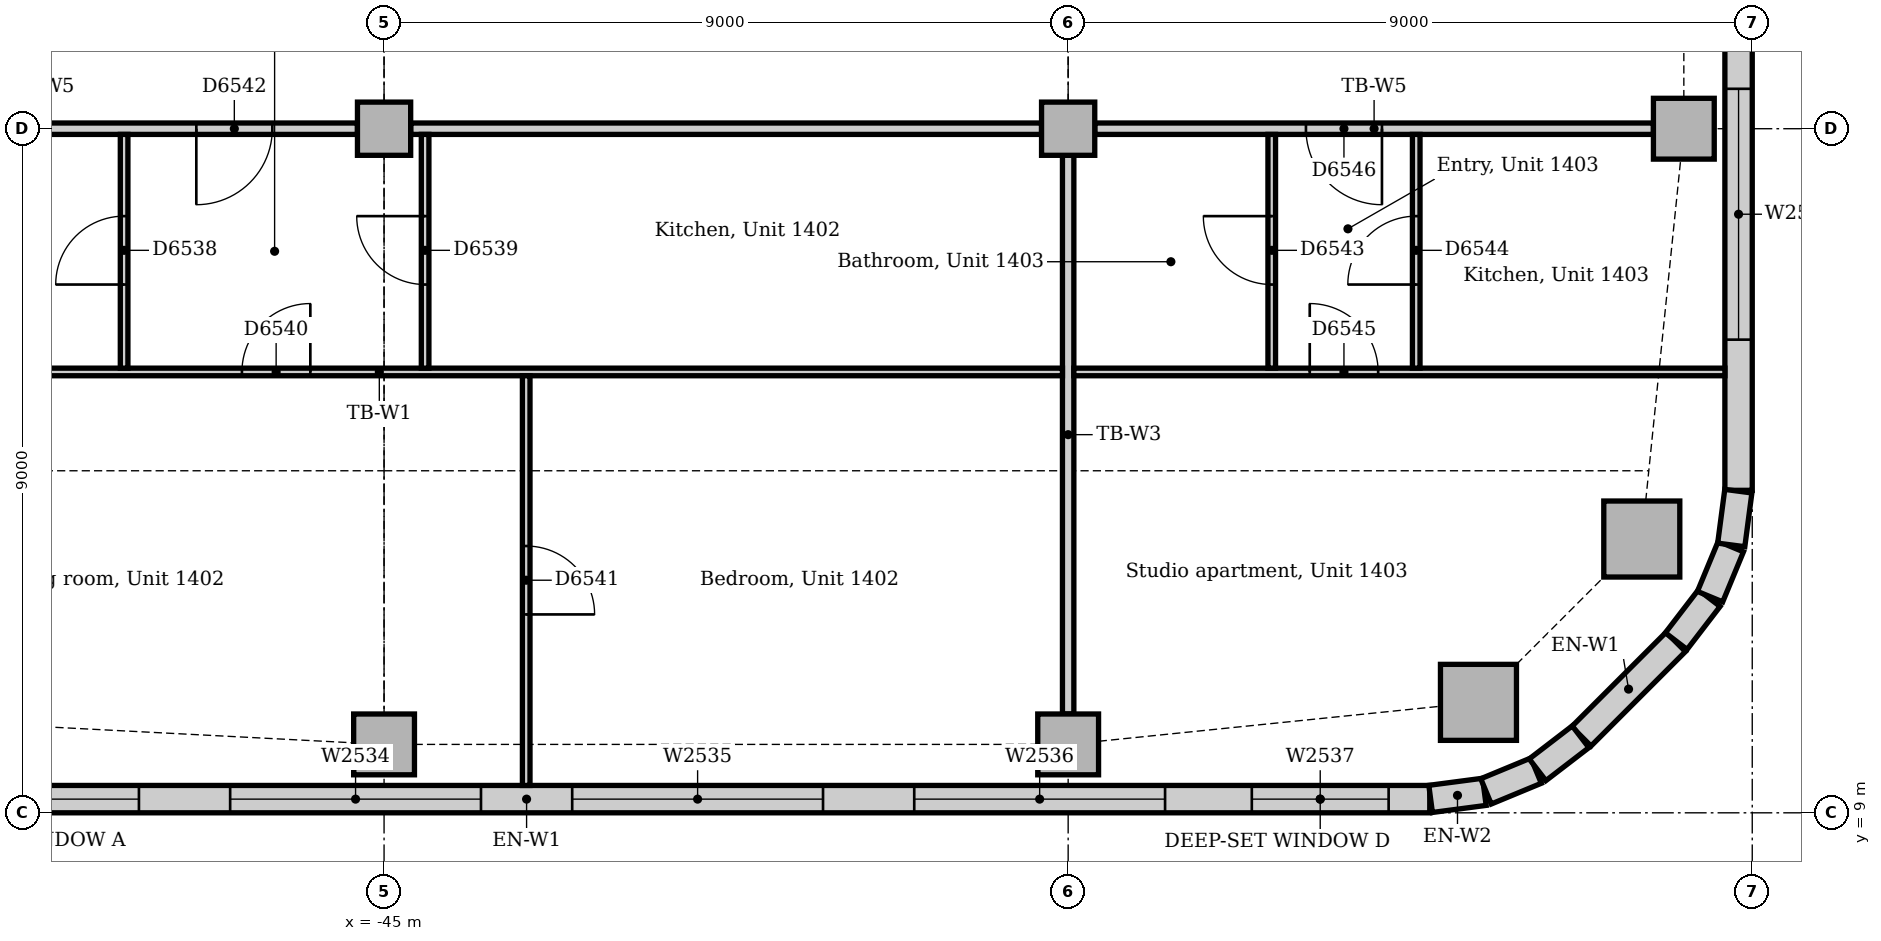
"""IFC4 building model, lengths in metres.
Left out: names, types, materials, properties, quantities, classifications, styles, units other than length and angle.
Written with IfcOpenShell. Run it as: python <this file> out.ifc"""

import sys

from ifc_helpers import new_model, si_unit, direction, frame, frame_2d, origin, origin_2d, place, context, subcontext, project, spatial, rectangle, extrude, element, fill, save


model = new_model("IFC4")
c1 = context("Model", 3, precision=1e-05, world=origin(), true_north=direction((0.0, 1.0)))
c2 = subcontext(c1, "Body", "Model", "MODEL_VIEW")
j1 = project(units=[si_unit("LENGTHUNIT", "METRE"), si_unit("PLANEANGLEUNIT", "RADIAN")], contexts=[c1])
p1 = place(None, origin())
s1 = spatial("IfcSite", under=j1, at=p1, CompositionType="ELEMENT")
p2 = place(p1, origin())
s2 = spatial("IfcBuilding", under=s1, at=p2, CompositionType="ELEMENT")
p3 = place(p2, frame((0.0, 0.0, 63.0)))
s3 = spatial("IfcBuildingStorey", under=s2, at=p3, CompositionType="ELEMENT", Elevation=63.0)
for number, where, z_axis, x_axis in (
    (1, (-30.602, 10.453, 0.0), (0.0, 0.0, 1.0), (1.0, 0.0, 0.0)),
    (2, (-28.453, 12.602, 0.0), (0.0, 0.0, 1.0), (1.0, 0.0, 0.0)),
):
    element("IfcColumn", number, at=place(p3, frame(where, z_axis=z_axis, x_axis=x_axis)), inside=s3, PredefinedType="COLUMN", context=c2, shape_type="SweptSolid", body=[
        extrude(rectangle(XDim=1.0, YDim=1.0, at=origin_2d()), origin(), (0.0, 0.0, 1.0), 3.85),
    ])
for number, where, z_axis, x_axis in (
    (3, (-45.0, 9.9, 0.0), (0.0, 0.0, 1.0), (1.0, 0.0, 0.0)),
    (4, (-36.0, 9.9, 0.0), (0.0, 0.0, 1.0), (1.0, 0.0, 0.0)),
    (5, (-27.9, 18.0, 0.0), (0.0, 0.0, 1.0), (1.0, 0.0, 0.0)),
):
    element("IfcColumn", number, at=place(p3, frame(where, z_axis=z_axis, x_axis=x_axis)), inside=s3, PredefinedType="COLUMN", context=c2, shape_type="SweptSolid", body=[
        extrude(rectangle(XDim=0.8, YDim=0.8, at=origin_2d()), origin(), (0.0, 0.0, 1.0), 3.85),
    ])
for number, where, z_axis, x_axis in (
    (6, (-45.0, 18.0, 0.0), (0.0, 0.0, 1.0), (1.0, 0.0, 0.0)),
    (7, (-36.0, 18.0, 0.0), (0.0, 0.0, 1.0), (1.0, 0.0, 0.0)),
):
    element("IfcColumn", number, at=place(p3, frame(where, z_axis=z_axis, x_axis=x_axis)), inside=s3, PredefinedType="COLUMN", context=c2, shape_type="SweptSolid", body=[
        extrude(rectangle(XDim=0.7, YDim=0.7, at=origin_2d()), origin(), (0.0, 0.0, 1.0), 3.85),
    ])
p4 = place(p3, frame((-55.007, 9.18, 0.0), z_axis=(0.0, 0.0, 1.0), x_axis=(1.0, 0.0, 0.0)))
e8 = element("IfcWall", 8, at=p4, inside=s3, PredefinedType="STANDARD", context=c2, shape_type="SweptSolid", body=[
    extrude(rectangle(XDim=23.765, YDim=0.36, at=frame_2d((11.882, 0.0))), origin(), (0.0, 0.0, 1.0), 3.85),
])
p5 = place(p4, frame((3.482, 0.0, 0.9)))
e9 = element("IfcOpeningElement", 9, at=p5, cuts=e8, PredefinedType="OPENING", context=c2, shape_type="SweptSolid", body=[
    extrude(rectangle(XDim=3.3, YDim=1.6, at=frame_2d((1.65, 0.8))), frame((0.0, 0.19, 0.0), z_axis=(0.0, -1.0, 0.0), x_axis=(1.0, 0.0, 0.0)), (0.0, 0.0, 1.0), 0.38),
])
p6 = place(p4, frame((7.982, 0.0, 0.9)))
e10 = element("IfcOpeningElement", 10, at=p6, cuts=e8, PredefinedType="OPENING", context=c2, shape_type="SweptSolid", body=[
    extrude(rectangle(XDim=3.3, YDim=1.6, at=frame_2d((1.65, 0.8))), frame((0.0, 0.19, 0.0), z_axis=(0.0, -1.0, 0.0), x_axis=(1.0, 0.0, 0.0)), (0.0, 0.0, 1.0), 0.38),
])
p7 = place(p4, frame((12.482, 0.0, 0.9)))
e11 = element("IfcOpeningElement", 11, at=p7, cuts=e8, PredefinedType="OPENING", context=c2, shape_type="SweptSolid", body=[
    extrude(rectangle(XDim=3.3, YDim=1.6, at=frame_2d((1.65, 0.8))), frame((0.0, 0.19, 0.0), z_axis=(0.0, -1.0, 0.0), x_axis=(1.0, 0.0, 0.0)), (0.0, 0.0, 1.0), 0.38),
])
p8 = place(p4, frame((16.982, 0.0, 0.9)))
e12 = element("IfcOpeningElement", 12, at=p8, cuts=e8, PredefinedType="OPENING", context=c2, shape_type="SweptSolid", body=[
    extrude(rectangle(XDim=3.3, YDim=1.6, at=frame_2d((1.65, 0.8))), frame((0.0, 0.19, 0.0), z_axis=(0.0, -1.0, 0.0), x_axis=(1.0, 0.0, 0.0)), (0.0, 0.0, 1.0), 0.38),
])
p9 = place(p4, frame((21.424, 0.0, 0.9)))
e13 = element("IfcOpeningElement", 13, at=p9, cuts=e8, PredefinedType="OPENING", context=c2, shape_type="SweptSolid", body=[
    extrude(rectangle(XDim=1.8, YDim=1.6, at=frame_2d((0.9, 0.8))), frame((0.0, 0.19, 0.0), z_axis=(0.0, -1.0, 0.0), x_axis=(1.0, 0.0, 0.0)), (0.0, 0.0, 1.0), 0.38),
])
p10 = place(p3, frame((-29.249, 10.006, 0.0), z_axis=(0.0, 0.0, 1.0), x_axis=(0.707106781187, 0.707106781187, 0.0)))
e14 = element("IfcWall", 14, at=p10, inside=s3, PredefinedType="STANDARD", context=c2, shape_type="SweptSolid", body=[
    extrude(rectangle(XDim=1.757, YDim=0.36, at=frame_2d((0.879, 0.0))), origin(), (0.0, 0.0, 1.0), 3.85),
])
p11 = place(p3, frame((-27.18, 13.243, 0.0), z_axis=(0.0, 0.0, 1.0), x_axis=(0.0, 1.0, 0.0)))
e15 = element("IfcWall", 15, at=p11, inside=s3, PredefinedType="STANDARD", context=c2, shape_type="SweptSolid", body=[
    extrude(rectangle(XDim=7.757, YDim=0.36, at=frame_2d((3.879, 0.0))), origin(), (0.0, 0.0, 1.0), 3.85),
])
p12 = place(p11, frame((1.982, 0.0, 0.9)))
e16 = element("IfcOpeningElement", 16, at=p12, cuts=e15, PredefinedType="OPENING", context=c2, shape_type="SweptSolid", body=[
    extrude(rectangle(XDim=3.3, YDim=1.6, at=frame_2d((1.65, 0.8))), frame((0.0, 0.19, 0.0), z_axis=(0.0, -1.0, 0.0), x_axis=(1.0, 0.0, 0.0)), (0.0, 0.0, 1.0), 0.38),
])
for number, where, z_axis, x_axis in (
    (17, (-31.231, 9.183, 0.0), (0.0, 0.0, 1.0), (0.991, 0.131, 0.0)),
    (18, (-30.503, 9.282, 0.0), (0.0, 0.0, 1.0), (0.924, 0.383, 0.0)),
):
    element("IfcWall", number, at=place(p3, frame(where, z_axis=z_axis, x_axis=x_axis)), inside=s3, PredefinedType="STANDARD", context=c2, shape_type="SweptSolid", body=[
        extrude(rectangle(XDim=0.713, YDim=0.36, at=frame_2d((0.356, 0.0))), origin(), (0.0, 0.0, 1.0), 3.85),
    ])
for number, where, z_axis, x_axis in (
    (19, (-29.825, 9.566, 0.0), (0.0, 0.0, 1.0), (0.793, 0.609, 0.0)),
    (20, (-28.0, 11.259, 0.0), (0.0, 0.0, 1.0), (0.609, 0.793, 0.0)),
):
    element("IfcWall", number, at=place(p3, frame(where, z_axis=z_axis, x_axis=x_axis)), inside=s3, PredefinedType="STANDARD", context=c2, shape_type="SweptSolid", body=[
        extrude(rectangle(XDim=0.713, YDim=0.36, at=frame_2d((0.357, 0.0))), origin(), (0.0, 0.0, 1.0), 3.85),
    ])
for number, where, z_axis, x_axis in (
    (21, (-27.555, 11.844, 0.0), (0.0, 0.0, 1.0), (0.383, 0.924, 0.0)),
    (22, (-27.276, 12.524, 0.0), (0.0, 0.0, 1.0), (0.131, 0.991, 0.0)),
):
    element("IfcWall", number, at=place(p3, frame(where, z_axis=z_axis, x_axis=x_axis)), inside=s3, PredefinedType="STANDARD", context=c2, shape_type="SweptSolid", body=[
        extrude(rectangle(XDim=0.713, YDim=0.36, at=frame_2d((0.356, 0.0))), origin(), (0.0, 0.0, 1.0), 3.85),
    ])
p13 = place(p3, frame((-35.65, 18.0, 0.0), z_axis=(0.0, 0.0, 1.0), x_axis=(1.0, 0.0, 0.0)))
e23 = element("IfcWall", 23, at=p13, inside=s3, PredefinedType="PARTITIONING", context=c2, shape_type="SweptSolid", body=[
    extrude(rectangle(XDim=7.35, YDim=0.15, at=frame_2d((3.675, 0.0))), origin(), (0.0, 0.0, 1.0), 3.158),
])
p14 = place(p13, frame((2.778, 0.0, 0.0)))
e24 = element("IfcOpeningElement", 24, at=p14, cuts=e23, PredefinedType="OPENING", context=c2, shape_type="SweptSolid", body=[
    extrude(rectangle(XDim=1.0, YDim=2.1, at=frame_2d((0.5, 1.05))), frame((0.0, 0.085, 0.0), z_axis=(0.0, -1.0, 0.0), x_axis=(1.0, 0.0, 0.0)), (0.0, 0.0, 1.0), 0.17),
])
p15 = place(p3, frame((-44.65, 18.0, 0.0), z_axis=(0.0, 0.0, 1.0), x_axis=(1.0, 0.0, 0.0)))
e25 = element("IfcWall", 25, at=p15, inside=s3, PredefinedType="PARTITIONING", context=c2, shape_type="SweptSolid", body=[
    extrude(rectangle(XDim=8.3, YDim=0.15, at=frame_2d((4.15, 0.0))), origin(), (0.0, 0.0, 1.0), 3.158),
])
p16 = place(p3, frame((-53.65, 18.0, 0.0), z_axis=(0.0, 0.0, 1.0), x_axis=(1.0, 0.0, 0.0)))
e26 = element("IfcWall", 26, at=p16, inside=s3, PredefinedType="PARTITIONING", context=c2, shape_type="SweptSolid", body=[
    extrude(rectangle(XDim=8.3, YDim=0.15, at=frame_2d((4.15, 0.0))), origin(), (0.0, 0.0, 1.0), 3.158),
])
p17 = place(p16, frame((6.18, 0.0, 0.0)))
e27 = element("IfcOpeningElement", 27, at=p17, cuts=e26, PredefinedType="OPENING", context=c2, shape_type="SweptSolid", body=[
    extrude(rectangle(XDim=1.0, YDim=2.1, at=frame_2d((0.5, 1.05))), frame((0.0, 0.085, 0.0), z_axis=(0.0, -1.0, 0.0), x_axis=(1.0, 0.0, 0.0)), (0.0, 0.0, 1.0), 0.17),
])
p18 = place(p3, frame((-36.0, 10.3, 0.0), z_axis=(0.0, 0.0, 1.0), x_axis=(0.0, 1.0, 0.0)))
e28 = element("IfcWall", 28, at=p18, inside=s3, PredefinedType="PARTITIONING", context=c2, shape_type="SweptSolid", body=[
    extrude(rectangle(XDim=7.35, YDim=0.15, at=frame_2d((3.675, 0.0))), origin(), (0.0, 0.0, 1.0), 3.256),
])
p19 = place(p3, frame((-54.05, 14.8, 0.0), z_axis=(0.0, 0.0, 1.0), x_axis=(1.0, 0.0, 0.0)))
e29 = element("IfcWall", 29, at=p19, inside=s3, PredefinedType="PARTITIONING", context=c2, shape_type="SweptSolid", body=[
    extrude(rectangle(XDim=17.975, YDim=0.1, at=frame_2d((8.988, 0.0))), origin(), (0.0, 0.0, 1.0), 3.85),
])
p20 = place(p19, frame((7.18, 0.0, 0.0)))
e30 = element("IfcOpeningElement", 30, at=p20, cuts=e29, PredefinedType="OPENING", context=c2, shape_type="SweptSolid", body=[
    extrude(rectangle(XDim=0.9, YDim=2.1, at=frame_2d((0.45, 1.05))), frame((0.0, 0.06, 0.0), z_axis=(0.0, -1.0, 0.0), x_axis=(1.0, 0.0, 0.0)), (0.0, 0.0, 1.0), 0.12),
])
p21 = place(p3, frame((-35.925, 14.8, 0.0), z_axis=(0.0, 0.0, 1.0), x_axis=(1.0, 0.0, 0.0)))
e31 = element("IfcWall", 31, at=p21, inside=s3, PredefinedType="PARTITIONING", context=c2, shape_type="SweptSolid", body=[
    extrude(rectangle(XDim=8.565, YDim=0.1, at=frame_2d((4.282, 0.0))), origin(), (0.0, 0.0, 1.0), 3.85),
])
p22 = place(p21, frame((3.103, 0.0, 0.0)))
e32 = element("IfcOpeningElement", 32, at=p22, cuts=e31, PredefinedType="OPENING", context=c2, shape_type="SweptSolid", body=[
    extrude(rectangle(XDim=0.9, YDim=2.1, at=frame_2d((0.45, 1.05))), frame((0.0, 0.06, 0.0), z_axis=(0.0, -1.0, 0.0), x_axis=(1.0, 0.0, 0.0)), (0.0, 0.0, 1.0), 0.12),
])
p23 = place(p3, frame((-43.13, 9.36, 0.0), z_axis=(0.0, 0.0, 1.0), x_axis=(0.0, 1.0, 0.0)))
e33 = element("IfcWall", 33, at=p23, inside=s3, PredefinedType="PARTITIONING", context=c2, shape_type="SweptSolid", body=[
    extrude(rectangle(XDim=5.39, YDim=0.1, at=frame_2d((2.695, 0.0))), origin(), (0.0, 0.0, 1.0), 3.85),
])
p24 = place(p23, frame((2.25, 0.0, 0.0)))
e34 = element("IfcOpeningElement", 34, at=p24, cuts=e33, PredefinedType="OPENING", context=c2, shape_type="SweptSolid", body=[
    extrude(rectangle(XDim=0.9, YDim=2.1, at=frame_2d((0.45, 1.05))), frame((0.0, 0.06, 0.0), z_axis=(0.0, -1.0, 0.0), x_axis=(1.0, 0.0, 0.0)), (0.0, 0.0, 1.0), 0.12),
])
p25 = place(p3, frame((-48.42, 14.85, 0.0), z_axis=(0.0, 0.0, 1.0), x_axis=(0.0, 1.0, 0.0)))
e35 = element("IfcWall", 35, at=p25, inside=s3, PredefinedType="PARTITIONING", context=c2, shape_type="SweptSolid", body=[
    extrude(rectangle(XDim=3.075, YDim=0.1, at=frame_2d((1.538, 0.0))), origin(), (0.0, 0.0, 1.0), 3.85),
])
p26 = place(p25, frame((1.1, 0.0, 0.0)))
e36 = element("IfcOpeningElement", 36, at=p26, cuts=e35, PredefinedType="OPENING", context=c2, shape_type="SweptSolid", body=[
    extrude(rectangle(XDim=0.9, YDim=2.1, at=frame_2d((0.45, 1.05))), frame((0.0, 0.06, 0.0), z_axis=(0.0, -1.0, 0.0), x_axis=(1.0, 0.0, 0.0)), (0.0, 0.0, 1.0), 0.12),
])
p27 = place(p3, frame((-44.46, 14.85, 0.0), z_axis=(0.0, 0.0, 1.0), x_axis=(0.0, 1.0, 0.0)))
e37 = element("IfcWall", 37, at=p27, inside=s3, PredefinedType="PARTITIONING", context=c2, shape_type="SweptSolid", body=[
    extrude(rectangle(XDim=3.075, YDim=0.1, at=frame_2d((1.538, 0.0))), origin(), (0.0, 0.0, 1.0), 3.85),
])
p28 = place(p27, frame((1.1, 0.0, 0.0)))
e38 = element("IfcOpeningElement", 38, at=p28, cuts=e37, PredefinedType="OPENING", context=c2, shape_type="SweptSolid", body=[
    extrude(rectangle(XDim=0.9, YDim=2.1, at=frame_2d((0.45, 1.05))), frame((0.0, 0.06, 0.0), z_axis=(0.0, -1.0, 0.0), x_axis=(1.0, 0.0, 0.0)), (0.0, 0.0, 1.0), 0.12),
])
p29 = place(p3, frame((-33.322, 14.85, 0.0), z_axis=(0.0, 0.0, 1.0), x_axis=(0.0, 1.0, 0.0)))
e39 = element("IfcWall", 39, at=p29, inside=s3, PredefinedType="PARTITIONING", context=c2, shape_type="SweptSolid", body=[
    extrude(rectangle(XDim=3.075, YDim=0.1, at=frame_2d((1.538, 0.0))), origin(), (0.0, 0.0, 1.0), 3.85),
])
p30 = place(p29, frame((1.1, 0.0, 0.0)))
e40 = element("IfcOpeningElement", 40, at=p30, cuts=e39, PredefinedType="OPENING", context=c2, shape_type="SweptSolid", body=[
    extrude(rectangle(XDim=0.9, YDim=2.1, at=frame_2d((0.45, 1.05))), frame((0.0, 0.06, 0.0), z_axis=(0.0, -1.0, 0.0), x_axis=(1.0, 0.0, 0.0)), (0.0, 0.0, 1.0), 0.12),
])
p31 = place(p3, frame((-31.421, 14.85, 0.0), z_axis=(0.0, 0.0, 1.0), x_axis=(0.0, 1.0, 0.0)))
e41 = element("IfcWall", 41, at=p31, inside=s3, PredefinedType="PARTITIONING", context=c2, shape_type="SweptSolid", body=[
    extrude(rectangle(XDim=3.075, YDim=0.1, at=frame_2d((1.538, 0.0))), origin(), (0.0, 0.0, 1.0), 3.85),
])
p32 = place(p31, frame((1.1, 0.0, 0.0)))
e42 = element("IfcOpeningElement", 42, at=p32, cuts=e41, PredefinedType="OPENING", context=c2, shape_type="SweptSolid", body=[
    extrude(rectangle(XDim=0.9, YDim=2.1, at=frame_2d((0.45, 1.05))), frame((0.0, 0.06, 0.0), z_axis=(0.0, -1.0, 0.0), x_axis=(1.0, 0.0, 0.0)), (0.0, 0.0, 1.0), 0.12),
])
p33 = place(p5, origin())
e43 = element("IfcWindow", 43, at=p33, inside=s3, PartitioningType="SINGLE_PANEL", PredefinedType="WINDOW", context=c2, shape_type="SweptSolid", body=[
    extrude(rectangle(XDim=3.3, YDim=1.6, at=frame_2d((1.65, 0.8))), frame((0.0, 0.13, 0.0), z_axis=(0.0, -1.0, 0.0), x_axis=(1.0, 0.0, 0.0)), (0.0, 0.0, 1.0), 0.06),
])
fill(e9, e43)
p34 = place(p6, origin())
e44 = element("IfcWindow", 44, at=p34, inside=s3, PartitioningType="SINGLE_PANEL", PredefinedType="WINDOW", context=c2, shape_type="SweptSolid", body=[
    extrude(rectangle(XDim=3.3, YDim=1.6, at=frame_2d((1.65, 0.8))), frame((0.0, 0.13, 0.0), z_axis=(0.0, -1.0, 0.0), x_axis=(1.0, 0.0, 0.0)), (0.0, 0.0, 1.0), 0.06),
])
fill(e10, e44)
p35 = place(p7, origin())
e45 = element("IfcWindow", 45, at=p35, inside=s3, PartitioningType="SINGLE_PANEL", PredefinedType="WINDOW", context=c2, shape_type="SweptSolid", body=[
    extrude(rectangle(XDim=3.3, YDim=1.6, at=frame_2d((1.65, 0.8))), frame((0.0, 0.13, 0.0), z_axis=(0.0, -1.0, 0.0), x_axis=(1.0, 0.0, 0.0)), (0.0, 0.0, 1.0), 0.06),
])
fill(e11, e45)
p36 = place(p8, origin())
e46 = element("IfcWindow", 46, at=p36, inside=s3, PartitioningType="SINGLE_PANEL", PredefinedType="WINDOW", context=c2, shape_type="SweptSolid", body=[
    extrude(rectangle(XDim=3.3, YDim=1.6, at=frame_2d((1.65, 0.8))), frame((0.0, 0.13, 0.0), z_axis=(0.0, -1.0, 0.0), x_axis=(1.0, 0.0, 0.0)), (0.0, 0.0, 1.0), 0.06),
])
fill(e12, e46)
p37 = place(p9, origin())
e47 = element("IfcWindow", 47, at=p37, inside=s3, PartitioningType="SINGLE_PANEL", PredefinedType="WINDOW", context=c2, shape_type="SweptSolid", body=[
    extrude(rectangle(XDim=1.8, YDim=1.6, at=frame_2d((0.9, 0.8))), frame((0.0, 0.13, 0.0), z_axis=(0.0, -1.0, 0.0), x_axis=(1.0, 0.0, 0.0)), (0.0, 0.0, 1.0), 0.06),
])
fill(e13, e47)
p38 = place(p12, origin())
e48 = element("IfcWindow", 48, at=p38, inside=s3, PartitioningType="SINGLE_PANEL", PredefinedType="WINDOW", context=c2, shape_type="SweptSolid", body=[
    extrude(rectangle(XDim=3.3, YDim=1.6, at=frame_2d((1.65, 0.8))), frame((0.0, 0.13, 0.0), z_axis=(0.0, -1.0, 0.0), x_axis=(1.0, 0.0, 0.0)), (0.0, 0.0, 1.0), 0.06),
])
fill(e16, e48)
p39 = place(p26, origin())
e49 = element("IfcDoor", 49, at=p39, inside=s3, OperationType="SINGLE_SWING_LEFT", PredefinedType="DOOR", context=c2, shape_type="SweptSolid", body=[
    extrude(rectangle(XDim=0.9, YDim=2.1, at=frame_2d((0.45, 1.05))), frame((0.0, 0.025, 0.0), z_axis=(0.0, -1.0, 0.0), x_axis=(1.0, 0.0, 0.0)), (0.0, 0.0, 1.0), 0.05),
])
fill(e36, e49)
p40 = place(p28, origin())
e50 = element("IfcDoor", 50, at=p40, inside=s3, OperationType="SINGLE_SWING_RIGHT", PredefinedType="DOOR", context=c2, shape_type="SweptSolid", body=[
    extrude(rectangle(XDim=0.9, YDim=2.1, at=frame_2d((0.45, 1.05))), frame((0.0, 0.025, 0.0), z_axis=(0.0, -1.0, 0.0), x_axis=(1.0, 0.0, 0.0)), (0.0, 0.0, 1.0), 0.05),
])
fill(e38, e50)
p41 = place(p20, origin())
e51 = element("IfcDoor", 51, at=p41, inside=s3, OperationType="SINGLE_SWING_RIGHT", PredefinedType="DOOR", context=c2, shape_type="SweptSolid", body=[
    extrude(rectangle(XDim=0.9, YDim=2.1, at=frame_2d((0.45, 1.05))), frame((0.0, 0.025, 0.0), z_axis=(0.0, -1.0, 0.0), x_axis=(1.0, 0.0, 0.0)), (0.0, 0.0, 1.0), 0.05),
])
fill(e30, e51)
p42 = place(p24, frame((0.9, 0.0, 0.0), z_axis=(0.0, 0.0, 1.0), x_axis=(-1.0, 0.0, 0.0)))
e52 = element("IfcDoor", 52, at=p42, inside=s3, OperationType="SINGLE_SWING_RIGHT", PredefinedType="DOOR", context=c2, shape_type="SweptSolid", body=[
    extrude(rectangle(XDim=0.9, YDim=2.1, at=frame_2d((0.45, 1.05))), frame((0.0, 0.025, 0.0), z_axis=(0.0, -1.0, 0.0), x_axis=(1.0, 0.0, 0.0)), (0.0, 0.0, 1.0), 0.05),
])
fill(e34, e52)
p43 = place(p17, frame((1.0, 0.0, 0.0), z_axis=(0.0, 0.0, 1.0), x_axis=(-1.0, 0.0, 0.0)))
e53 = element("IfcDoor", 53, at=p43, inside=s3, OperationType="SINGLE_SWING_RIGHT", PredefinedType="DOOR", context=c2, shape_type="SweptSolid", body=[
    extrude(rectangle(XDim=1.0, YDim=2.1, at=frame_2d((0.5, 1.05))), frame((0.0, 0.025, 0.0), z_axis=(0.0, -1.0, 0.0), x_axis=(1.0, 0.0, 0.0)), (0.0, 0.0, 1.0), 0.05),
])
fill(e27, e53)
p44 = place(p30, origin())
e54 = element("IfcDoor", 54, at=p44, inside=s3, OperationType="SINGLE_SWING_RIGHT", PredefinedType="DOOR", context=c2, shape_type="SweptSolid", body=[
    extrude(rectangle(XDim=0.9, YDim=2.1, at=frame_2d((0.45, 1.05))), frame((0.0, 0.025, 0.0), z_axis=(0.0, -1.0, 0.0), x_axis=(1.0, 0.0, 0.0)), (0.0, 0.0, 1.0), 0.05),
])
fill(e40, e54)
p45 = place(p32, origin())
e55 = element("IfcDoor", 55, at=p45, inside=s3, OperationType="SINGLE_SWING_LEFT", PredefinedType="DOOR", context=c2, shape_type="SweptSolid", body=[
    extrude(rectangle(XDim=0.9, YDim=2.1, at=frame_2d((0.45, 1.05))), frame((0.0, 0.025, 0.0), z_axis=(0.0, -1.0, 0.0), x_axis=(1.0, 0.0, 0.0)), (0.0, 0.0, 1.0), 0.05),
])
fill(e42, e55)
p46 = place(p22, origin())
e56 = element("IfcDoor", 56, at=p46, inside=s3, OperationType="SINGLE_SWING_LEFT", PredefinedType="DOOR", context=c2, shape_type="SweptSolid", body=[
    extrude(rectangle(XDim=0.9, YDim=2.1, at=frame_2d((0.45, 1.05))), frame((0.0, 0.025, 0.0), z_axis=(0.0, -1.0, 0.0), x_axis=(1.0, 0.0, 0.0)), (0.0, 0.0, 1.0), 0.05),
])
fill(e32, e56)
p47 = place(p14, frame((1.0, 0.0, 0.0), z_axis=(0.0, 0.0, 1.0), x_axis=(-1.0, 0.0, 0.0)))
e57 = element("IfcDoor", 57, at=p47, inside=s3, OperationType="SINGLE_SWING_LEFT", PredefinedType="DOOR", context=c2, shape_type="SweptSolid", body=[
    extrude(rectangle(XDim=1.0, YDim=2.1, at=frame_2d((0.5, 1.05))), frame((0.0, 0.025, 0.0), z_axis=(0.0, -1.0, 0.0), x_axis=(1.0, 0.0, 0.0)), (0.0, 0.0, 1.0), 0.05),
])
fill(e24, e57)
save(model, sys.argv[1])
